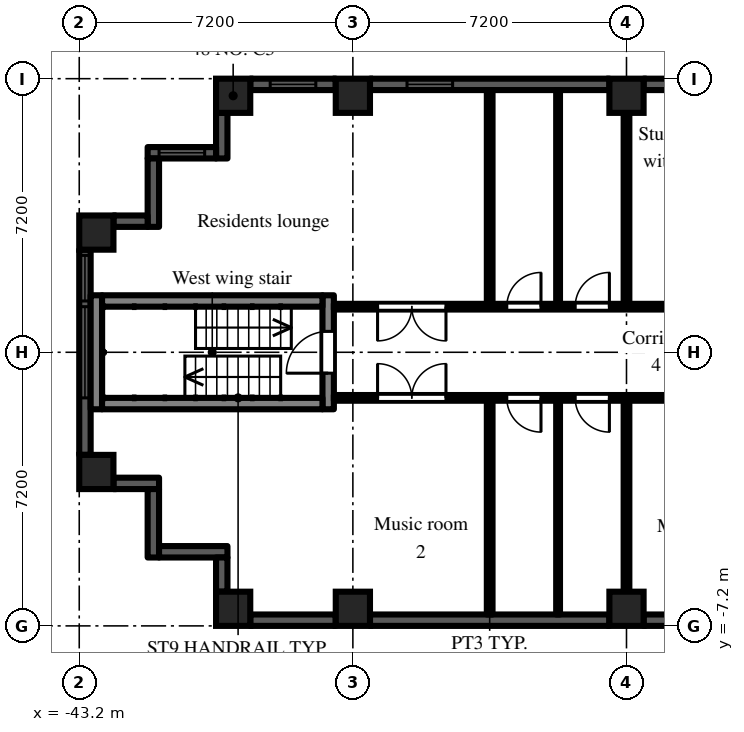
"""IFC4 building model, lengths in metres.
Left out: names, types, materials, properties, quantities, classifications, styles, units other than length and angle.
Written with IfcOpenShell. Run it as: python <this file> out.ifc"""

import sys

from ifc_helpers import new_model, si_unit, direction, frame, frame_2d, origin, origin_2d, place, context, subcontext, project, spatial, rectangle, extrude, element, fill, save


model = new_model("IFC4")
c1 = context("Model", 3, precision=1e-05, world=origin(), true_north=direction((0.0, 1.0)))
c2 = subcontext(c1, "Body", "Model", "MODEL_VIEW")
j1 = project(units=[si_unit("LENGTHUNIT", "METRE"), si_unit("PLANEANGLEUNIT", "RADIAN")], contexts=[c1])
p1 = place(None, origin())
s1 = spatial("IfcSite", under=j1, at=p1, CompositionType="ELEMENT")
p2 = place(p1, origin())
s2 = spatial("IfcBuilding", under=s1, at=p2, CompositionType="ELEMENT")
p3 = place(p2, frame((0.0, 0.0, 102.9)))
s3 = spatial("IfcBuildingStorey", under=s2, at=p3, CompositionType="ELEMENT", Elevation=102.9)
for number, where, z_axis, x_axis in (
    (1, (-42.75, -3.15, 0.0), (0.0, 0.0, 1.0), (1.0, 0.0, 0.0)),
    (2, (-42.75, 3.15, 0.0), (0.0, 0.0, 1.0), (1.0, 0.0, 0.0)),
    (3, (-39.15, -6.75, 0.0), (0.0, 0.0, 1.0), (1.0, 0.0, 0.0)),
    (4, (-39.15, 6.75, 0.0), (0.0, 0.0, 1.0), (1.0, 0.0, 0.0)),
    (5, (-36.0, -6.75, 0.0), (0.0, 0.0, 1.0), (1.0, 0.0, 0.0)),
    (6, (-36.0, 6.75, 0.0), (0.0, 0.0, 1.0), (1.0, 0.0, 0.0)),
    (7, (-28.8, -6.75, 0.0), (0.0, 0.0, 1.0), (1.0, 0.0, 0.0)),
    (8, (-28.8, 6.75, 0.0), (0.0, 0.0, 1.0), (1.0, 0.0, 0.0)),
):
    element("IfcColumn", number, at=place(p3, frame(where, z_axis=z_axis, x_axis=x_axis)), inside=s3, PredefinedType="COLUMN", context=c2, shape_type="SweptSolid", body=[
        extrude(rectangle(XDim=0.9, YDim=0.9, at=origin_2d()), origin(), (0.0, 0.0, 1.0), 3.0),
    ])
p4 = place(p3, frame((-25.2, 7.05, 0.0), z_axis=(0.0, 0.0, 1.0), x_axis=(-1.0, 0.0, 0.0)))
e9 = element("IfcWall", 9, at=p4, inside=s3, PredefinedType="SOLIDWALL", context=c2, shape_type="SweptSolid", body=[
    extrude(rectangle(XDim=3.15, YDim=0.3, at=frame_2d((1.575, 0.0))), origin(), (0.0, 0.0, 1.0), 2.1),
])
p5 = place(p4, frame((0.975, 0.0, 0.2)))
e10 = element("IfcOpeningElement", 10, at=p5, cuts=e9, PredefinedType="OPENING", context=c2, shape_type="SweptSolid", body=[
    extrude(rectangle(XDim=1.2, YDim=1.85, at=frame_2d((0.6, 0.925))), frame((0.0, 0.16, 0.0), z_axis=(0.0, -1.0, 0.0), x_axis=(1.0, 0.0, 0.0)), (0.0, 0.0, 1.0), 0.32),
])
p6 = place(p3, frame((-29.25, 7.05, 0.0), z_axis=(0.0, 0.0, 1.0), x_axis=(-1.0, 0.0, 0.0)))
e11 = element("IfcWall", 11, at=p6, inside=s3, PredefinedType="SOLIDWALL", context=c2, shape_type="SweptSolid", body=[
    extrude(rectangle(XDim=6.3, YDim=0.3, at=frame_2d((3.15, 0.0))), origin(), (0.0, 0.0, 1.0), 2.1),
])
p7 = place(p6, frame((4.125, 0.0, 0.2)))
e12 = element("IfcOpeningElement", 12, at=p7, cuts=e11, PredefinedType="OPENING", context=c2, shape_type="SweptSolid", body=[
    extrude(rectangle(XDim=1.2, YDim=1.85, at=frame_2d((0.6, 0.925))), frame((0.0, 0.16, 0.0), z_axis=(0.0, -1.0, 0.0), x_axis=(1.0, 0.0, 0.0)), (0.0, 0.0, 1.0), 0.32),
])
p8 = place(p3, frame((-36.45, 7.05, 0.0), z_axis=(0.0, 0.0, 1.0), x_axis=(-1.0, 0.0, 0.0)))
e13 = element("IfcWall", 13, at=p8, inside=s3, PredefinedType="SOLIDWALL", context=c2, shape_type="SweptSolid", body=[
    extrude(rectangle(XDim=2.25, YDim=0.3, at=frame_2d((1.125, 0.0))), origin(), (0.0, 0.0, 1.0), 2.1),
])
p9 = place(p8, frame((0.525, 0.0, 0.2)))
e14 = element("IfcOpeningElement", 14, at=p9, cuts=e13, PredefinedType="OPENING", context=c2, shape_type="SweptSolid", body=[
    extrude(rectangle(XDim=1.2, YDim=1.85, at=frame_2d((0.6, 0.925))), frame((0.0, 0.16, 0.0), z_axis=(0.0, -1.0, 0.0), x_axis=(1.0, 0.0, 0.0)), (0.0, 0.0, 1.0), 0.32),
])
p10 = place(p3, frame((-39.45, 6.3, 0.0), z_axis=(0.0, 0.0, 1.0), x_axis=(0.0, -1.0, 0.0)))
e15 = element("IfcWall", 15, at=p10, inside=s3, PredefinedType="SOLIDWALL", context=c2, shape_type="SweptSolid", body=[
    extrude(rectangle(XDim=1.2, YDim=0.3, at=frame_2d((0.6, 0.0))), origin(), (0.0, 0.0, 1.0), 2.575),
])
p11 = place(p3, frame((-39.6, 5.25, 0.0), z_axis=(0.0, 0.0, 1.0), x_axis=(-1.0, 0.0, 0.0)))
e16 = element("IfcWall", 16, at=p11, inside=s3, PredefinedType="SOLIDWALL", context=c2, shape_type="SweptSolid", body=[
    extrude(rectangle(XDim=1.8, YDim=0.3, at=frame_2d((0.9, 0.0))), origin(), (0.0, 0.0, 1.0), 2.575),
])
p12 = place(p11, frame((0.3, 0.0, 0.2)))
e17 = element("IfcOpeningElement", 17, at=p12, cuts=e16, PredefinedType="OPENING", context=c2, shape_type="SweptSolid", body=[
    extrude(rectangle(XDim=1.2, YDim=1.85, at=frame_2d((0.6, 0.925))), frame((0.0, 0.16, 0.0), z_axis=(0.0, -1.0, 0.0), x_axis=(1.0, 0.0, 0.0)), (0.0, 0.0, 1.0), 0.32),
])
p13 = place(p3, frame((-41.25, 5.1, 0.0), z_axis=(0.0, 0.0, 1.0), x_axis=(0.0, -1.0, 0.0)))
e18 = element("IfcWall", 18, at=p13, inside=s3, PredefinedType="SOLIDWALL", context=c2, shape_type="SweptSolid", body=[
    extrude(rectangle(XDim=1.8, YDim=0.3, at=frame_2d((0.9, 0.0))), origin(), (0.0, 0.0, 1.0), 2.575),
])
p14 = place(p3, frame((-41.4, 3.45, 0.0), z_axis=(0.0, 0.0, 1.0), x_axis=(-1.0, 0.0, 0.0)))
e19 = element("IfcWall", 19, at=p14, inside=s3, PredefinedType="SOLIDWALL", context=c2, shape_type="SweptSolid", body=[
    extrude(rectangle(XDim=0.9, YDim=0.3, at=frame_2d((0.45, 0.0))), origin(), (0.0, 0.0, 1.0), 2.575),
])
p15 = place(p3, frame((-43.05, 2.7, 0.0), z_axis=(0.0, 0.0, 1.0), x_axis=(0.0, -1.0, 0.0)))
e20 = element("IfcWall", 20, at=p15, inside=s3, PredefinedType="SOLIDWALL", context=c2, shape_type="SweptSolid", body=[
    extrude(rectangle(XDim=5.4, YDim=0.3, at=frame_2d((2.7, 0.0))), origin(), (0.0, 0.0, 1.0), 2.1),
])
p16 = place(p15, frame((1.5, 0.0, 0.2)))
e21 = element("IfcOpeningElement", 21, at=p16, cuts=e20, PredefinedType="OPENING", context=c2, shape_type="SweptSolid", body=[
    extrude(rectangle(XDim=2.4, YDim=1.85, at=frame_2d((1.2, 0.925))), frame((0.0, 0.16, 0.0), z_axis=(0.0, -1.0, 0.0), x_axis=(1.0, 0.0, 0.0)), (0.0, 0.0, 1.0), 0.32),
])
p17 = place(p15, frame((0.15, 0.0, 0.2)))
e22 = element("IfcOpeningElement", 22, at=p17, cuts=e20, PredefinedType="OPENING", context=c2, shape_type="SweptSolid", body=[
    extrude(rectangle(XDim=1.2, YDim=1.85, at=frame_2d((0.6, 0.925))), frame((0.0, 0.16, 0.0), z_axis=(0.0, -1.0, 0.0), x_axis=(1.0, 0.0, 0.0)), (0.0, 0.0, 1.0), 0.32),
])
p18 = place(p3, frame((-42.3, -3.45, 0.0), z_axis=(0.0, 0.0, 1.0), x_axis=(1.0, 0.0, 0.0)))
e23 = element("IfcWall", 23, at=p18, inside=s3, PredefinedType="SOLIDWALL", context=c2, shape_type="SweptSolid", body=[
    extrude(rectangle(XDim=1.2, YDim=0.3, at=frame_2d((0.6, 0.0))), origin(), (0.0, 0.0, 1.0), 2.575),
])
p19 = place(p3, frame((-41.25, -3.6, 0.0), z_axis=(0.0, 0.0, 1.0), x_axis=(0.0, -1.0, 0.0)))
e24 = element("IfcWall", 24, at=p19, inside=s3, PredefinedType="SOLIDWALL", context=c2, shape_type="SweptSolid", body=[
    extrude(rectangle(XDim=1.8, YDim=0.3, at=frame_2d((0.9, 0.0))), origin(), (0.0, 0.0, 1.0), 2.575),
])
p20 = place(p3, frame((-41.1, -5.25, 0.0), z_axis=(0.0, 0.0, 1.0), x_axis=(1.0, 0.0, 0.0)))
e25 = element("IfcWall", 25, at=p20, inside=s3, PredefinedType="SOLIDWALL", context=c2, shape_type="SweptSolid", body=[
    extrude(rectangle(XDim=1.8, YDim=0.3, at=frame_2d((0.9, 0.0))), origin(), (0.0, 0.0, 1.0), 2.575),
])
p21 = place(p3, frame((-39.45, -5.4, 0.0), z_axis=(0.0, 0.0, 1.0), x_axis=(0.0, -1.0, 0.0)))
e26 = element("IfcWall", 26, at=p21, inside=s3, PredefinedType="SOLIDWALL", context=c2, shape_type="SweptSolid", body=[
    extrude(rectangle(XDim=0.9, YDim=0.3, at=frame_2d((0.45, 0.0))), origin(), (0.0, 0.0, 1.0), 2.575),
])
p22 = place(p3, frame((-38.7, -7.05, 0.0), z_axis=(0.0, 0.0, 1.0), x_axis=(1.0, 0.0, 0.0)))
e27 = element("IfcWall", 27, at=p22, inside=s3, PredefinedType="SOLIDWALL", context=c2, shape_type="SweptSolid", body=[
    extrude(rectangle(XDim=2.25, YDim=0.3, at=frame_2d((1.125, 0.0))), origin(), (0.0, 0.0, 1.0), 2.1),
])
p23 = place(p3, frame((-35.55, -7.05, 0.0), z_axis=(0.0, 0.0, 1.0), x_axis=(1.0, 0.0, 0.0)))
e28 = element("IfcWall", 28, at=p23, inside=s3, PredefinedType="SOLIDWALL", context=c2, shape_type="SweptSolid", body=[
    extrude(rectangle(XDim=6.3, YDim=0.3, at=frame_2d((3.15, 0.0))), origin(), (0.0, 0.0, 1.0), 2.1),
])
p24 = place(p3, frame((-28.35, -7.05, 0.0), z_axis=(0.0, 0.0, 1.0), x_axis=(1.0, 0.0, 0.0)))
e29 = element("IfcWall", 29, at=p24, inside=s3, PredefinedType="SOLIDWALL", context=c2, shape_type="SweptSolid", body=[
    extrude(rectangle(XDim=3.15, YDim=0.3, at=frame_2d((1.575, 0.0))), origin(), (0.0, 0.0, 1.0), 2.1),
])
p25 = place(p3, frame((-36.65, -1.5, 0.0), z_axis=(0.0, 0.0, 1.0), x_axis=(0.0, 1.0, 0.0)))
e30 = element("IfcWall", 30, at=p25, inside=s3, PredefinedType="SHEAR", context=c2, shape_type="SweptSolid", body=[
    extrude(rectangle(XDim=3.0, YDim=0.3, at=frame_2d((1.5, 0.0))), origin(), (0.0, 0.0, 1.0), 2.575),
])
p26 = place(p25, frame((0.95, 0.0, 0.0)))
e31 = element("IfcOpeningElement", 31, at=p26, cuts=e30, PredefinedType="OPENING", context=c2, shape_type="SweptSolid", body=[
    extrude(rectangle(XDim=1.1, YDim=2.1, at=frame_2d((0.55, 1.05))), frame((0.0, 0.16, 0.0), z_axis=(0.0, -1.0, 0.0), x_axis=(1.0, 0.0, 0.0)), (0.0, 0.0, 1.0), 0.32),
])
p27 = place(p3, frame((-42.75, -1.5, 0.0), z_axis=(0.0, 0.0, 1.0), x_axis=(0.0, 1.0, 0.0)))
e32 = element("IfcWall", 32, at=p27, inside=s3, PredefinedType="SHEAR", context=c2, shape_type="SweptSolid", body=[
    extrude(rectangle(XDim=3.0, YDim=0.3, at=frame_2d((1.5, 0.0))), origin(), (0.0, 0.0, 1.0), 2.575),
])
for number, where, z_axis, x_axis in (
    (33, (-36.8, -1.35, 0.0), (0.0, 0.0, 1.0), (-1.0, 0.0, 0.0)),
    (34, (-36.8, 1.35, 0.0), (0.0, 0.0, 1.0), (-1.0, 0.0, 0.0)),
):
    element("IfcWall", number, at=place(p3, frame(where, z_axis=z_axis, x_axis=x_axis)), inside=s3, PredefinedType="SHEAR", context=c2, shape_type="SweptSolid", body=[
        extrude(rectangle(XDim=5.8, YDim=0.3, at=frame_2d((2.9, 0.0))), origin(), (0.0, 0.0, 1.0), 2.575),
    ])
p28 = place(p3, frame((-36.5, -1.2, 0.0), z_axis=(0.0, 0.0, 1.0), x_axis=(1.0, 0.0, 0.0)))
e35 = element("IfcWall", 35, at=p28, inside=s3, PredefinedType="PARTITIONING", context=c2, shape_type="SweptSolid", body=[
    extrude(rectangle(XDim=14.9, YDim=0.15, at=frame_2d((7.45, 0.0))), origin(), (0.0, 0.0, 1.0), 2.575),
])
p29 = place(p28, frame((10.4, 0.0, 0.0)))
e36 = element("IfcOpeningElement", 36, at=p29, cuts=e35, PredefinedType="OPENING", context=c2, shape_type="SweptSolid", body=[
    extrude(rectangle(XDim=1.8, YDim=2.1, at=frame_2d((0.9, 1.05))), frame((0.0, 0.085, 0.0), z_axis=(0.0, -1.0, 0.0), x_axis=(1.0, 0.0, 0.0)), (0.0, 0.0, 1.0), 0.17),
])
p30 = place(p28, frame((6.35, 0.0, 0.0)))
e37 = element("IfcOpeningElement", 37, at=p30, cuts=e35, PredefinedType="OPENING", context=c2, shape_type="SweptSolid", body=[
    extrude(rectangle(XDim=0.9, YDim=2.1, at=frame_2d((0.45, 1.05))), frame((0.0, 0.085, 0.0), z_axis=(0.0, -1.0, 0.0), x_axis=(1.0, 0.0, 0.0)), (0.0, 0.0, 1.0), 0.17),
])
p31 = place(p28, frame((4.55, 0.0, 0.0)))
e38 = element("IfcOpeningElement", 38, at=p31, cuts=e35, PredefinedType="OPENING", context=c2, shape_type="SweptSolid", body=[
    extrude(rectangle(XDim=0.9, YDim=2.1, at=frame_2d((0.45, 1.05))), frame((0.0, 0.085, 0.0), z_axis=(0.0, -1.0, 0.0), x_axis=(1.0, 0.0, 0.0)), (0.0, 0.0, 1.0), 0.17),
])
p32 = place(p28, frame((1.15, 0.0, 0.0)))
e39 = element("IfcOpeningElement", 39, at=p32, cuts=e35, PredefinedType="OPENING", context=c2, shape_type="SweptSolid", body=[
    extrude(rectangle(XDim=1.8, YDim=2.1, at=frame_2d((0.9, 1.05))), frame((0.0, 0.085, 0.0), z_axis=(0.0, -1.0, 0.0), x_axis=(1.0, 0.0, 0.0)), (0.0, 0.0, 1.0), 0.17),
])
p33 = place(p3, frame((-36.5, 1.2, 0.0), z_axis=(0.0, 0.0, 1.0), x_axis=(1.0, 0.0, 0.0)))
e40 = element("IfcWall", 40, at=p33, inside=s3, PredefinedType="PARTITIONING", context=c2, shape_type="SweptSolid", body=[
    extrude(rectangle(XDim=14.9, YDim=0.15, at=frame_2d((7.45, 0.0))), origin(), (0.0, 0.0, 1.0), 2.575),
])
p34 = place(p33, frame((10.1, 0.0, 0.0)))
e41 = element("IfcOpeningElement", 41, at=p34, cuts=e40, PredefinedType="OPENING", context=c2, shape_type="SweptSolid", body=[
    extrude(rectangle(XDim=1.0, YDim=2.1, at=frame_2d((0.5, 1.05))), frame((0.0, 0.085, 0.0), z_axis=(0.0, -1.0, 0.0), x_axis=(1.0, 0.0, 0.0)), (0.0, 0.0, 1.0), 0.17),
])
p35 = place(p33, frame((6.35, 0.0, 0.0)))
e42 = element("IfcOpeningElement", 42, at=p35, cuts=e40, PredefinedType="OPENING", context=c2, shape_type="SweptSolid", body=[
    extrude(rectangle(XDim=0.9, YDim=2.1, at=frame_2d((0.45, 1.05))), frame((0.0, 0.085, 0.0), z_axis=(0.0, -1.0, 0.0), x_axis=(1.0, 0.0, 0.0)), (0.0, 0.0, 1.0), 0.17),
])
p36 = place(p33, frame((4.55, 0.0, 0.0)))
e43 = element("IfcOpeningElement", 43, at=p36, cuts=e40, PredefinedType="OPENING", context=c2, shape_type="SweptSolid", body=[
    extrude(rectangle(XDim=0.9, YDim=2.1, at=frame_2d((0.45, 1.05))), frame((0.0, 0.085, 0.0), z_axis=(0.0, -1.0, 0.0), x_axis=(1.0, 0.0, 0.0)), (0.0, 0.0, 1.0), 0.17),
])
p37 = place(p33, frame((1.15, 0.0, 0.0)))
e44 = element("IfcOpeningElement", 44, at=p37, cuts=e40, PredefinedType="OPENING", context=c2, shape_type="SweptSolid", body=[
    extrude(rectangle(XDim=1.8, YDim=2.1, at=frame_2d((0.9, 1.05))), frame((0.0, 0.085, 0.0), z_axis=(0.0, -1.0, 0.0), x_axis=(1.0, 0.0, 0.0)), (0.0, 0.0, 1.0), 0.17),
])
for number, where, z_axis, x_axis in (
    (45, (-32.4, -6.9, 0.0), (0.0, 0.0, 1.0), (0.0, 1.0, 0.0)),
    (46, (-32.4, 1.275, 0.0), (0.0, 0.0, 1.0), (0.0, 1.0, 0.0)),
):
    element("IfcWall", number, at=place(p3, frame(where, z_axis=z_axis, x_axis=x_axis)), inside=s3, PredefinedType="PARTITIONING", context=c2, shape_type="SweptSolid", body=[
        extrude(rectangle(XDim=5.625, YDim=0.15, at=frame_2d((2.812, 0.0))), origin(), (0.0, 0.0, 1.0), 2.575),
    ])
for number, where, z_axis, x_axis in (
    (47, (-30.6, -6.9, 0.0), (0.0, 0.0, 1.0), (0.0, 1.0, 0.0)),
    (48, (-30.6, 1.275, 0.0), (0.0, 0.0, 1.0), (0.0, 1.0, 0.0)),
):
    element("IfcWall", number, at=place(p3, frame(where, z_axis=z_axis, x_axis=x_axis)), inside=s3, PredefinedType="PARTITIONING", context=c2, shape_type="SweptSolid", body=[
        extrude(rectangle(XDim=5.625, YDim=0.1, at=frame_2d((2.812, 0.0))), origin(), (0.0, 0.0, 1.0), 2.575),
    ])
for number, where, z_axis, x_axis in (
    (49, (-28.8, -6.9, 0.0), (0.0, 0.0, 1.0), (0.0, 1.0, 0.0)),
    (50, (-28.8, 1.275, 0.0), (0.0, 0.0, 1.0), (0.0, 1.0, 0.0)),
):
    element("IfcWall", number, at=place(p3, frame(where, z_axis=z_axis, x_axis=x_axis)), inside=s3, PredefinedType="PARTITIONING", context=c2, shape_type="SweptSolid", body=[
        extrude(rectangle(XDim=5.625, YDim=0.15, at=frame_2d((2.812, 0.0))), origin(), (0.0, 0.0, 1.0), 2.575),
    ])
p38 = place(p7, origin())
e51 = element("IfcWindow", 51, at=p38, inside=s3, PartitioningType="SINGLE_PANEL", PredefinedType="WINDOW", context=c2, shape_type="SweptSolid", body=[
    extrude(rectangle(XDim=1.2, YDim=1.85, at=frame_2d((0.6, 0.925))), frame((0.0, 0.03, 0.0), z_axis=(0.0, -1.0, 0.0), x_axis=(1.0, 0.0, 0.0)), (0.0, 0.0, 1.0), 0.06),
])
fill(e12, e51)
p39 = place(p9, origin())
e52 = element("IfcWindow", 52, at=p39, inside=s3, PartitioningType="SINGLE_PANEL", PredefinedType="WINDOW", context=c2, shape_type="SweptSolid", body=[
    extrude(rectangle(XDim=1.2, YDim=1.85, at=frame_2d((0.6, 0.925))), frame((0.0, 0.03, 0.0), z_axis=(0.0, -1.0, 0.0), x_axis=(1.0, 0.0, 0.0)), (0.0, 0.0, 1.0), 0.06),
])
fill(e14, e52)
p40 = place(p12, origin())
e53 = element("IfcWindow", 53, at=p40, inside=s3, PartitioningType="SINGLE_PANEL", PredefinedType="WINDOW", context=c2, shape_type="SweptSolid", body=[
    extrude(rectangle(XDim=1.2, YDim=1.85, at=frame_2d((0.6, 0.925))), frame((0.0, 0.03, 0.0), z_axis=(0.0, -1.0, 0.0), x_axis=(1.0, 0.0, 0.0)), (0.0, 0.0, 1.0), 0.06),
])
fill(e17, e53)
p41 = place(p16, origin())
e54 = element("IfcWindow", 54, at=p41, inside=s3, PartitioningType="SINGLE_PANEL", PredefinedType="WINDOW", context=c2, shape_type="SweptSolid", body=[
    extrude(rectangle(XDim=2.4, YDim=1.85, at=frame_2d((1.2, 0.925))), frame((0.0, 0.03, 0.0), z_axis=(0.0, -1.0, 0.0), x_axis=(1.0, 0.0, 0.0)), (0.0, 0.0, 1.0), 0.06),
])
fill(e21, e54)
p42 = place(p17, origin())
e55 = element("IfcWindow", 55, at=p42, inside=s3, PartitioningType="SINGLE_PANEL", PredefinedType="WINDOW", context=c2, shape_type="SweptSolid", body=[
    extrude(rectangle(XDim=1.2, YDim=1.85, at=frame_2d((0.6, 0.925))), frame((0.0, 0.03, 0.0), z_axis=(0.0, -1.0, 0.0), x_axis=(1.0, 0.0, 0.0)), (0.0, 0.0, 1.0), 0.06),
])
fill(e22, e55)
p43 = place(p26, origin())
e56 = element("IfcDoor", 56, at=p43, inside=s3, OperationType="SINGLE_SWING_LEFT", PredefinedType="DOOR", context=c2, shape_type="SweptSolid", body=[
    extrude(rectangle(XDim=1.1, YDim=2.1, at=frame_2d((0.55, 1.05))), frame((0.0, 0.025, 0.0), z_axis=(0.0, -1.0, 0.0), x_axis=(1.0, 0.0, 0.0)), (0.0, 0.0, 1.0), 0.05),
])
fill(e31, e56)
p44 = place(p30, frame((0.9, 0.0, 0.0), z_axis=(0.0, 0.0, 1.0), x_axis=(-1.0, 0.0, 0.0)))
e57 = element("IfcDoor", 57, at=p44, inside=s3, OperationType="SINGLE_SWING_LEFT", PredefinedType="DOOR", context=c2, shape_type="SweptSolid", body=[
    extrude(rectangle(XDim=0.9, YDim=2.1, at=frame_2d((0.45, 1.05))), frame((0.0, 0.025, 0.0), z_axis=(0.0, -1.0, 0.0), x_axis=(1.0, 0.0, 0.0)), (0.0, 0.0, 1.0), 0.05),
])
fill(e37, e57)
p45 = place(p31, frame((0.9, 0.0, 0.0), z_axis=(0.0, 0.0, 1.0), x_axis=(-1.0, 0.0, 0.0)))
e58 = element("IfcDoor", 58, at=p45, inside=s3, OperationType="SINGLE_SWING_LEFT", PredefinedType="DOOR", context=c2, shape_type="SweptSolid", body=[
    extrude(rectangle(XDim=0.9, YDim=2.1, at=frame_2d((0.45, 1.05))), frame((0.0, 0.025, 0.0), z_axis=(0.0, -1.0, 0.0), x_axis=(1.0, 0.0, 0.0)), (0.0, 0.0, 1.0), 0.05),
])
fill(e38, e58)
p46 = place(p32, origin())
e59 = element("IfcDoor", 59, at=p46, inside=s3, OperationType="DOUBLE_DOOR_DOUBLE_SWING", PredefinedType="DOOR", context=c2, shape_type="SweptSolid", body=[
    extrude(rectangle(XDim=1.8, YDim=2.1, at=frame_2d((0.9, 1.05))), frame((0.0, 0.025, 0.0), z_axis=(0.0, -1.0, 0.0), x_axis=(1.0, 0.0, 0.0)), (0.0, 0.0, 1.0), 0.05),
])
fill(e39, e59)
p47 = place(p35, origin())
e60 = element("IfcDoor", 60, at=p47, inside=s3, OperationType="SINGLE_SWING_RIGHT", PredefinedType="DOOR", context=c2, shape_type="SweptSolid", body=[
    extrude(rectangle(XDim=0.9, YDim=2.1, at=frame_2d((0.45, 1.05))), frame((0.0, 0.025, 0.0), z_axis=(0.0, -1.0, 0.0), x_axis=(1.0, 0.0, 0.0)), (0.0, 0.0, 1.0), 0.05),
])
fill(e42, e60)
p48 = place(p36, origin())
e61 = element("IfcDoor", 61, at=p48, inside=s3, OperationType="SINGLE_SWING_RIGHT", PredefinedType="DOOR", context=c2, shape_type="SweptSolid", body=[
    extrude(rectangle(XDim=0.9, YDim=2.1, at=frame_2d((0.45, 1.05))), frame((0.0, 0.025, 0.0), z_axis=(0.0, -1.0, 0.0), x_axis=(1.0, 0.0, 0.0)), (0.0, 0.0, 1.0), 0.05),
])
fill(e43, e61)
p49 = place(p37, frame((1.8, 0.0, 0.0), z_axis=(0.0, 0.0, 1.0), x_axis=(-1.0, 0.0, 0.0)))
e62 = element("IfcDoor", 62, at=p49, inside=s3, OperationType="DOUBLE_DOOR_DOUBLE_SWING", PredefinedType="DOOR", context=c2, shape_type="SweptSolid", body=[
    extrude(rectangle(XDim=1.8, YDim=2.1, at=frame_2d((0.9, 1.05))), frame((0.0, 0.025, 0.0), z_axis=(0.0, -1.0, 0.0), x_axis=(1.0, 0.0, 0.0)), (0.0, 0.0, 1.0), 0.05),
])
fill(e44, e62)
save(model, sys.argv[1])
